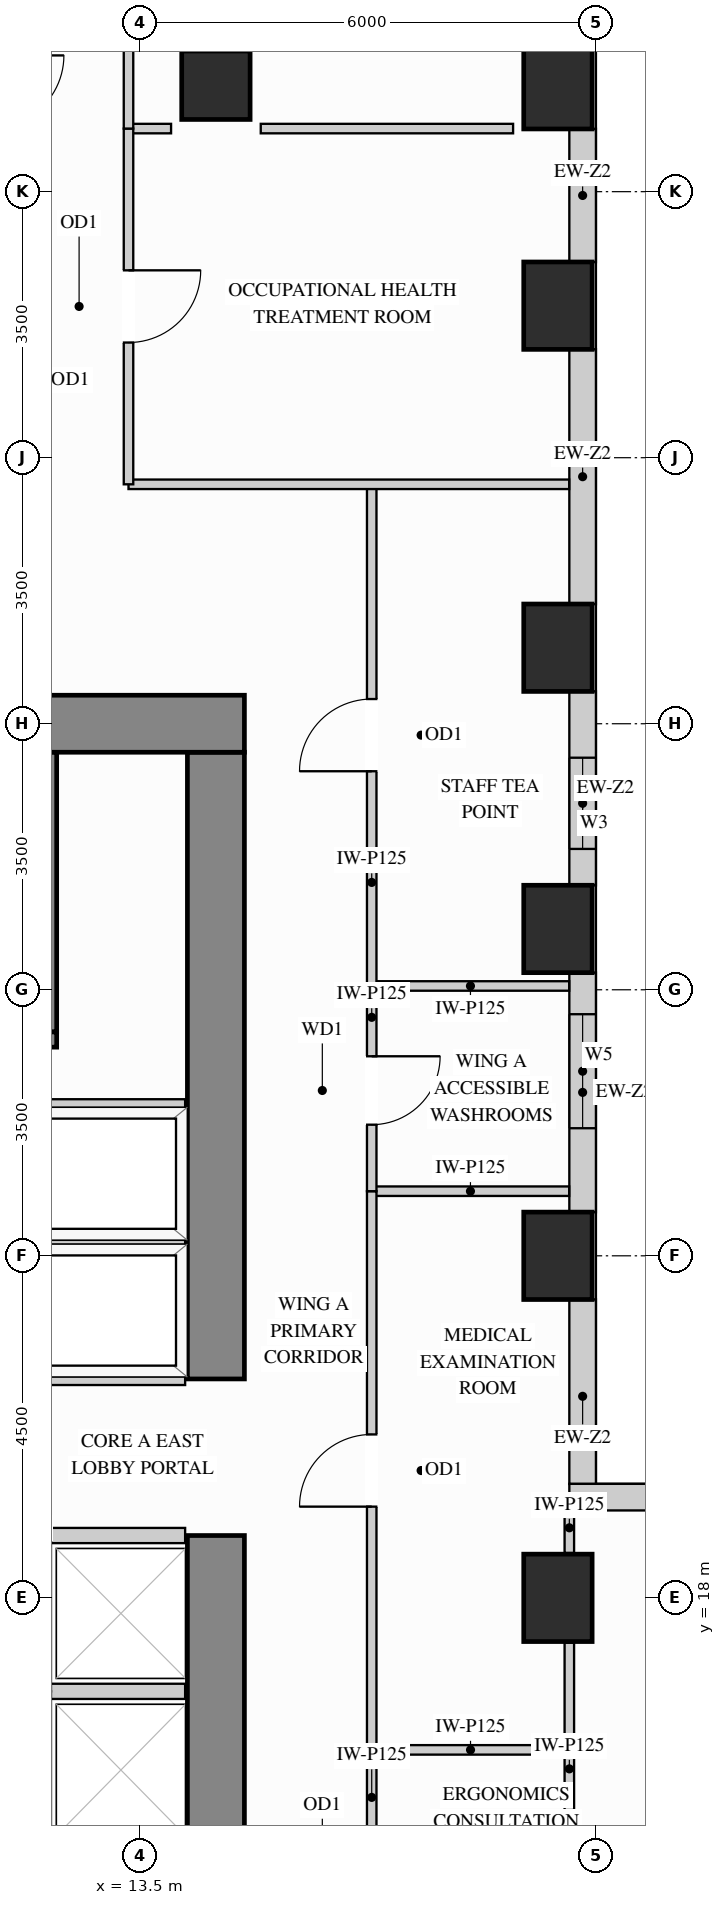
"""IFC4 building model, lengths in metres.
Left out: names, types, materials, properties, quantities, classifications, styles, units other than length and angle.
Written with IfcOpenShell. Run it as: python <this file> out.ifc"""

import sys

from ifc_helpers import new_model, si_unit, direction, frame, frame_2d, origin, origin_2d, place, context, subcontext, project, spatial, rectangle, extrude, source, transform, mapped, element, fill, save


model = new_model("IFC4")
c1 = context("Model", 3, precision=1e-05, world=origin(), true_north=direction((0.0, 1.0)))
c2 = subcontext(c1, "Body", "Model", "MODEL_VIEW")
j1 = project(units=[si_unit("LENGTHUNIT", "METRE"), si_unit("PLANEANGLEUNIT", "RADIAN")], contexts=[c1])
p1 = place(None, origin())
s1 = spatial("IfcSite", under=j1, at=p1, CompositionType="ELEMENT")
p2 = place(p1, origin())
s2 = spatial("IfcBuilding", under=s1, at=p2, CompositionType="ELEMENT")
p3 = place(p2, frame((0.0, 0.0, 117.0)))
s3 = spatial("IfcBuildingStorey", under=s2, at=p3, CompositionType="ELEMENT", Elevation=117.0)
m1 = source(origin(), c2, "Body", "SweptSolid", [
    extrude(rectangle(XDim=0.9, YDim=0.9, at=origin_2d()), origin(), (0.0, 0.0, 1.0), 3.38),
])
p4 = place(p3, frame((14.5, 37.9, 0.0), z_axis=(0.0, 0.0, 1.0), x_axis=(1.0, 0.0, 0.0)))
e1 = element("IfcColumn", 1, at=p4, inside=s3, PredefinedType="COLUMN", context=c2, shape_type="MappedRepresentation", body=[
    mapped(m1, transform((0.0, 0.0, 0.0), x_axis=(1.0, 0.0, 0.0), y_axis=(0.0, 1.0, 0.0), z_axis=(0.0, 0.0, 1.0))),
])
m2 = source(origin(), c2, "Body", "SweptSolid", [
    extrude(rectangle(XDim=0.9, YDim=1.15, at=origin_2d()), origin(), (0.0, 0.0, 1.0), 3.38),
])
for number, where, z_axis, x_axis in (
    (2, (19.0, 18.0, 0.0), (0.0, 0.0, 1.0), (1.0, 0.0, 0.0)),
    (3, (19.0, 22.5, 0.0), (0.0, 0.0, 1.0), (1.0, 0.0, 0.0)),
    (4, (19.0, 26.8, 0.0), (0.0, 0.0, 1.0), (1.0, 0.0, 0.0)),
    (5, (19.0, 30.5, 0.0), (0.0, 0.0, 1.0), (1.0, 0.0, 0.0)),
    (6, (19.0, 35.0, 0.0), (0.0, 0.0, 1.0), (1.0, 0.0, 0.0)),
    (7, (19.0, 37.9, 0.0), (0.0, 0.0, 1.0), (1.0, 0.0, 0.0)),
):
    element("IfcColumn", number, at=place(p3, frame(where, z_axis=z_axis, x_axis=x_axis)), inside=s3, PredefinedType="COLUMN", context=c2, shape_type="MappedRepresentation", body=[
        mapped(m2, transform((0.0, 0.0, 0.0), x_axis=(1.0, 0.0, 0.0), y_axis=(0.0, 1.0, 0.0), z_axis=(0.0, 0.0, 1.0))),
    ])
m3 = source(origin(), c2, "Body", "SweptSolid", [
    extrude(rectangle(XDim=9.945, YDim=0.75, at=frame_2d((4.973, 0.0))), origin(), (0.0, 0.0, 1.0), 3.38),
])
p5 = place(p3, frame((14.5, 8.875, 0.0), z_axis=(0.0, 0.0, 1.0), x_axis=(0.0, 1.0, 0.0)))
e8 = element("IfcWall", 8, at=p5, inside=s3, PredefinedType="SHEAR", context=c2, shape_type="MappedRepresentation", body=[
    mapped(m3, transform((0.0, 0.0, 0.0), x_axis=(1.0, 0.0, 0.0), y_axis=(0.0, 1.0, 0.0), z_axis=(0.0, 0.0, 1.0))),
])
m4 = source(origin(), c2, "Body", "SweptSolid", [
    extrude(rectangle(XDim=8.245, YDim=0.75, at=frame_2d((4.123, 0.0))), origin(), (0.0, 0.0, 1.0), 3.38),
])
p6 = place(p3, frame((14.5, 20.88, 0.0), z_axis=(0.0, 0.0, 1.0), x_axis=(0.0, 1.0, 0.0)))
e9 = element("IfcWall", 9, at=p6, inside=s3, PredefinedType="SHEAR", context=c2, shape_type="MappedRepresentation", body=[
    mapped(m4, transform((0.0, 0.0, 0.0), x_axis=(1.0, 0.0, 0.0), y_axis=(0.0, 1.0, 0.0), z_axis=(0.0, 0.0, 1.0))),
])
m5 = source(origin(), c2, "Body", "SweptSolid", [
    extrude(rectangle(XDim=10.75, YDim=0.75, at=frame_2d((5.375, 0.0))), origin(), (0.0, 0.0, 1.0), 3.38),
])
p7 = place(p3, frame((4.125, 29.5, 0.0), z_axis=(0.0, 0.0, 1.0), x_axis=(1.0, 0.0, 0.0)))
e10 = element("IfcWall", 10, at=p7, inside=s3, PredefinedType="SHEAR", context=c2, shape_type="MappedRepresentation", body=[
    mapped(m5, transform((0.0, 0.0, 0.0), x_axis=(1.0, 0.0, 0.0), y_axis=(0.0, 1.0, 0.0), z_axis=(0.0, 0.0, 1.0))),
])
m6 = source(origin(), c2, "Body", "SweptSolid", [
    extrude(rectangle(XDim=2.429, YDim=0.35, at=frame_2d((1.214, 0.0))), origin(), (0.0, 0.0, 1.0), 2.519),
])
p8 = place(p3, frame((19.325, 19.498, 0.0), z_axis=(0.0, 0.0, 1.0), x_axis=(0.0, 1.0, 0.0)))
e11 = element("IfcWall", 11, at=p8, inside=s3, PredefinedType="SOLIDWALL", context=c2, shape_type="MappedRepresentation", body=[
    mapped(m6, transform((0.0, 0.0, 0.0), x_axis=(1.0, 0.0, 0.0), y_axis=(0.0, 1.0, 0.0), z_axis=(0.0, 0.0, 1.0))),
])
p9 = place(p3, frame((19.325, 23.073, 0.0), z_axis=(0.0, 0.0, 1.0), x_axis=(0.0, 1.0, 0.0)))
e12 = element("IfcWall", 12, at=p9, inside=s3, PredefinedType="SOLIDWALL", context=c2, shape_type="SweptSolid", body=[
    extrude(rectangle(XDim=3.154, YDim=0.35, at=frame_2d((1.577, 0.0))), origin(), (0.0, 0.0, 1.0), 2.519),
])
p10 = place(p9, frame((1.105, 0.0, 0.78)))
e13 = element("IfcOpeningElement", 13, at=p10, cuts=e12, PredefinedType="OPENING", context=c2, shape_type="SweptSolid", body=[
    extrude(rectangle(XDim=1.5, YDim=1.559, at=frame_2d((0.75, 0.78))), frame((0.0, 0.185, 0.0), z_axis=(0.0, -1.0, 0.0), x_axis=(1.0, 0.0, 0.0)), (0.0, 0.0, 1.0), 0.37),
])
p11 = place(p3, frame((19.325, 27.373, 0.0), z_axis=(0.0, 0.0, 1.0), x_axis=(0.0, 1.0, 0.0)))
e14 = element("IfcWall", 14, at=p11, inside=s3, PredefinedType="SOLIDWALL", context=c2, shape_type="SweptSolid", body=[
    extrude(rectangle(XDim=2.554, YDim=0.35, at=frame_2d((1.277, 0.0))), origin(), (0.0, 0.0, 1.0), 2.519),
])
p12 = place(p11, frame((0.48, 0.0, 0.78)))
e15 = element("IfcOpeningElement", 15, at=p12, cuts=e14, PredefinedType="OPENING", context=c2, shape_type="SweptSolid", body=[
    extrude(rectangle(XDim=1.2, YDim=1.559, at=frame_2d((0.6, 0.78))), frame((0.0, 0.185, 0.0), z_axis=(0.0, -1.0, 0.0), x_axis=(1.0, 0.0, 0.0)), (0.0, 0.0, 1.0), 0.37),
])
m7 = source(origin(), c2, "Body", "SweptSolid", [
    extrude(rectangle(XDim=3.354, YDim=0.35, at=frame_2d((1.677, 0.0))), origin(), (0.0, 0.0, 1.0), 2.519),
])
p13 = place(p3, frame((19.325, 31.073, 0.0), z_axis=(0.0, 0.0, 1.0), x_axis=(0.0, 1.0, 0.0)))
e16 = element("IfcWall", 16, at=p13, inside=s3, PredefinedType="SOLIDWALL", context=c2, shape_type="MappedRepresentation", body=[
    mapped(m7, transform((0.0, 0.0, 0.0), x_axis=(1.0, 0.0, 0.0), y_axis=(0.0, 1.0, 0.0), z_axis=(0.0, 0.0, 1.0))),
])
m8 = source(origin(), c2, "Body", "SweptSolid", [
    extrude(rectangle(XDim=1.754, YDim=0.35, at=frame_2d((0.877, 0.0))), origin(), (0.0, 0.0, 1.0), 2.519),
])
p14 = place(p3, frame((19.325, 35.573, 0.0), z_axis=(0.0, 0.0, 1.0), x_axis=(0.0, 1.0, 0.0)))
e17 = element("IfcWall", 17, at=p14, inside=s3, PredefinedType="SOLIDWALL", context=c2, shape_type="MappedRepresentation", body=[
    mapped(m8, transform((0.0, 0.0, 0.0), x_axis=(1.0, 0.0, 0.0), y_axis=(0.0, 1.0, 0.0), z_axis=(0.0, 0.0, 1.0))),
])
p15 = place(p3, frame((34.75, 19.325, 0.0), z_axis=(0.0, 0.0, 1.0), x_axis=(-1.0, 0.0, 0.0)))
e18 = element("IfcWall", 18, at=p15, inside=s3, PredefinedType="SOLIDWALL", context=c2, shape_type="SweptSolid", body=[
    extrude(rectangle(XDim=15.6, YDim=0.35, at=frame_2d((7.8, 0.0))), origin(), (0.0, 0.0, 1.0), 3.365),
])
p16 = place(p15, frame((4.307, 0.0, 0.78)))
e19 = element("IfcOpeningElement", 19, at=p16, cuts=e18, PredefinedType="OPENING", context=c2, shape_type="SweptSolid", body=[
    extrude(rectangle(XDim=1.5, YDim=2.0, at=frame_2d((0.75, 1.0))), frame((0.0, 0.185, 0.0), z_axis=(0.0, -1.0, 0.0), x_axis=(1.0, 0.0, 0.0)), (0.0, 0.0, 1.0), 0.37),
])
p17 = place(p15, frame((9.793, 0.0, 0.78)))
e20 = element("IfcOpeningElement", 20, at=p17, cuts=e18, PredefinedType="OPENING", context=c2, shape_type="SweptSolid", body=[
    extrude(rectangle(XDim=1.5, YDim=2.0, at=frame_2d((0.75, 1.0))), frame((0.0, 0.185, 0.0), z_axis=(0.0, -1.0, 0.0), x_axis=(1.0, 0.0, 0.0)), (0.0, 0.0, 1.0), 0.37),
])
m9 = source(origin(), c2, "Body", "SweptSolid", [
    extrude(rectangle(XDim=2.6, YDim=0.125, at=frame_2d((1.3, 0.0))), origin(), (0.0, 0.0, 1.0), 3.365),
])
p18 = place(p3, frame((16.55, 16.0, 0.0), z_axis=(0.0, 0.0, 1.0), x_axis=(1.0, 0.0, 0.0)))
e21 = element("IfcWall", 21, at=p18, inside=s3, PredefinedType="PARTITIONING", context=c2, shape_type="MappedRepresentation", body=[
    mapped(m9, transform((0.0, 0.0, 0.0), x_axis=(1.0, 0.0, 0.0), y_axis=(0.0, 1.0, 0.0), z_axis=(0.0, 0.0, 1.0))),
])
m10 = source(origin(), c2, "Body", "SweptSolid", [
    extrude(rectangle(XDim=2.598, YDim=0.125, at=frame_2d((1.299, 0.0))), origin(), (0.0, 0.0, 1.0), 3.365),
])
for number, where, z_axis, x_axis in (
    (22, (16.55, 23.35, 0.0), (0.0, 0.0, 1.0), (1.0, 0.0, 0.0)),
    (23, (16.55, 26.05, 0.0), (0.0, 0.0, 1.0), (1.0, 0.0, 0.0)),
):
    element("IfcWall", number, at=place(p3, frame(where, z_axis=z_axis, x_axis=x_axis)), inside=s3, PredefinedType="PARTITIONING", context=c2, shape_type="MappedRepresentation", body=[
        mapped(m10, transform((0.0, 0.0, 0.0), x_axis=(1.0, 0.0, 0.0), y_axis=(0.0, 1.0, 0.0), z_axis=(0.0, 0.0, 1.0))),
    ])
m11 = source(origin(), c2, "Body", "SweptSolid", [
    extrude(rectangle(XDim=3.32, YDim=0.125, at=frame_2d((1.66, 0.0))), origin(), (0.0, 0.0, 1.0), 2.677),
])
p19 = place(p3, frame((19.15, 14.09, 0.0), z_axis=(0.0, 0.0, 1.0), x_axis=(0.0, 1.0, 0.0)))
e24 = element("IfcWall", 24, at=p19, inside=s3, PredefinedType="PARTITIONING", context=c2, shape_type="MappedRepresentation", body=[
    mapped(m11, transform((0.0, 0.0, 0.0), x_axis=(1.0, 0.0, 0.0), y_axis=(0.0, 1.0, 0.0), z_axis=(0.0, 0.0, 1.0))),
])
m12 = source(origin(), c2, "Body", "SweptSolid", [
    extrude(rectangle(XDim=0.558, YDim=0.125, at=frame_2d((0.279, 0.0))), origin(), (0.0, 0.0, 1.0), 2.519),
])
p20 = place(p3, frame((19.15, 18.59, 0.0), z_axis=(0.0, 0.0, 1.0), x_axis=(0.0, 1.0, 0.0)))
e25 = element("IfcWall", 25, at=p20, inside=s3, PredefinedType="PARTITIONING", context=c2, shape_type="MappedRepresentation", body=[
    mapped(m12, transform((0.0, 0.0, 0.0), x_axis=(1.0, 0.0, 0.0), y_axis=(0.0, 1.0, 0.0), z_axis=(0.0, 0.0, 1.0))),
])
p21 = place(p3, frame((16.55, 12.35, 0.0), z_axis=(0.0, 0.0, 1.0), x_axis=(0.0, 1.0, 0.0)))
e26 = element("IfcWall", 26, at=p21, inside=s3, PredefinedType="PARTITIONING", context=c2, shape_type="SweptSolid", body=[
    extrude(rectangle(XDim=3.65, YDim=0.125, at=frame_2d((1.825, 0.0))), origin(), (0.0, 0.0, 1.0), 3.365),
])
p22 = place(p21, frame((1.35, 0.0, 0.0)))
e27 = element("IfcOpeningElement", 27, at=p22, cuts=e26, PredefinedType="OPENING", context=c2, shape_type="SweptSolid", body=[
    extrude(rectangle(XDim=0.95, YDim=2.15, at=frame_2d((0.475, 1.075))), frame((0.0, 0.073, 0.0), z_axis=(0.0, -1.0, 0.0), x_axis=(1.0, 0.0, 0.0)), (0.0, 0.0, 1.0), 0.145),
])
p23 = place(p3, frame((16.55, 16.0, 0.0), z_axis=(0.0, 0.0, 1.0), x_axis=(0.0, 1.0, 0.0)))
e28 = element("IfcWall", 28, at=p23, inside=s3, PredefinedType="PARTITIONING", context=c2, shape_type="SweptSolid", body=[
    extrude(rectangle(XDim=7.35, YDim=0.125, at=frame_2d((3.675, 0.0))), origin(), (0.0, 0.0, 1.0), 3.365),
])
p24 = place(p23, frame((3.2, 0.0, 0.0)))
e29 = element("IfcOpeningElement", 29, at=p24, cuts=e28, PredefinedType="OPENING", context=c2, shape_type="SweptSolid", body=[
    extrude(rectangle(XDim=0.95, YDim=2.15, at=frame_2d((0.475, 1.075))), frame((0.0, 0.073, 0.0), z_axis=(0.0, -1.0, 0.0), x_axis=(1.0, 0.0, 0.0)), (0.0, 0.0, 1.0), 0.145),
])
p25 = place(p3, frame((16.55, 26.05, 0.0), z_axis=(0.0, 0.0, 1.0), x_axis=(0.0, 1.0, 0.0)))
e30 = element("IfcWall", 30, at=p25, inside=s3, PredefinedType="PARTITIONING", context=c2, shape_type="SweptSolid", body=[
    extrude(rectangle(XDim=6.6, YDim=0.125, at=frame_2d((3.3, 0.0))), origin(), (0.0, 0.0, 1.0), 3.365),
])
p26 = place(p25, frame((2.825, 0.0, 0.0)))
e31 = element("IfcOpeningElement", 31, at=p26, cuts=e30, PredefinedType="OPENING", context=c2, shape_type="SweptSolid", body=[
    extrude(rectangle(XDim=0.95, YDim=2.15, at=frame_2d((0.475, 1.075))), frame((0.0, 0.073, 0.0), z_axis=(0.0, -1.0, 0.0), x_axis=(1.0, 0.0, 0.0)), (0.0, 0.0, 1.0), 0.145),
])
p27 = place(p3, frame((16.55, 23.35, 0.0), z_axis=(0.0, 0.0, 1.0), x_axis=(0.0, 1.0, 0.0)))
e32 = element("IfcWall", 32, at=p27, inside=s3, PredefinedType="PARTITIONING", context=c2, shape_type="SweptSolid", body=[
    extrude(rectangle(XDim=2.7, YDim=0.125, at=frame_2d((1.35, 0.0))), origin(), (0.0, 0.0, 1.0), 3.365),
])
p28 = place(p27, frame((0.875, 0.0, 0.0)))
e33 = element("IfcOpeningElement", 33, at=p28, cuts=e32, PredefinedType="OPENING", context=c2, shape_type="SweptSolid", body=[
    extrude(rectangle(XDim=0.9, YDim=2.15, at=frame_2d((0.45, 1.075))), frame((0.0, 0.073, 0.0), z_axis=(0.0, -1.0, 0.0), x_axis=(1.0, 0.0, 0.0)), (0.0, 0.0, 1.0), 0.145),
])
m13 = source(origin(), c2, "Body", "SweptSolid", [
    extrude(rectangle(XDim=0.56, YDim=0.125, at=frame_2d((0.28, 0.0))), origin(), (0.0, 0.0, 1.0), 3.365),
])
p29 = place(p3, frame((13.35, 37.33, 0.0), z_axis=(0.0, 0.0, 1.0), x_axis=(1.0, 0.0, 0.0)))
e34 = element("IfcWall", 34, at=p29, inside=s3, PredefinedType="PARTITIONING", context=c2, shape_type="MappedRepresentation", body=[
    mapped(m13, transform((0.0, 0.0, 0.0), x_axis=(1.0, 0.0, 0.0), y_axis=(0.0, 1.0, 0.0), z_axis=(0.0, 0.0, 1.0))),
])
m14 = source(origin(), c2, "Body", "SweptSolid", [
    extrude(rectangle(XDim=3.32, YDim=0.125, at=frame_2d((1.66, 0.0))), origin(), (0.0, 0.0, 1.0), 3.365),
])
p30 = place(p3, frame((15.09, 37.33, 0.0), z_axis=(0.0, 0.0, 1.0), x_axis=(1.0, 0.0, 0.0)))
e35 = element("IfcWall", 35, at=p30, inside=s3, PredefinedType="PARTITIONING", context=c2, shape_type="MappedRepresentation", body=[
    mapped(m14, transform((0.0, 0.0, 0.0), x_axis=(1.0, 0.0, 0.0), y_axis=(0.0, 1.0, 0.0), z_axis=(0.0, 0.0, 1.0))),
])
m15 = source(origin(), c2, "Body", "SweptSolid", [
    extrude(rectangle(XDim=5.798, YDim=0.125, at=frame_2d((2.899, 0.0))), origin(), (0.0, 0.0, 1.0), 3.365),
])
p31 = place(p3, frame((13.35, 32.65, 0.0), z_axis=(0.0, 0.0, 1.0), x_axis=(1.0, 0.0, 0.0)))
e36 = element("IfcWall", 36, at=p31, inside=s3, PredefinedType="PARTITIONING", context=c2, shape_type="MappedRepresentation", body=[
    mapped(m15, transform((0.0, 0.0, 0.0), x_axis=(1.0, 0.0, 0.0), y_axis=(0.0, 1.0, 0.0), z_axis=(0.0, 0.0, 1.0))),
])
p32 = place(p3, frame((13.35, 32.65, 0.0), z_axis=(0.0, 0.0, 1.0), x_axis=(0.0, 1.0, 0.0)))
e37 = element("IfcWall", 37, at=p32, inside=s3, PredefinedType="PARTITIONING", context=c2, shape_type="SweptSolid", body=[
    extrude(rectangle(XDim=4.68, YDim=0.125, at=frame_2d((2.34, 0.0))), origin(), (0.0, 0.0, 1.0), 3.365),
])
p33 = place(p32, frame((1.865, 0.0, 0.0)))
e38 = element("IfcOpeningElement", 38, at=p33, cuts=e37, PredefinedType="OPENING", context=c2, shape_type="SweptSolid", body=[
    extrude(rectangle(XDim=0.95, YDim=2.15, at=frame_2d((0.475, 1.075))), frame((0.0, 0.073, 0.0), z_axis=(0.0, -1.0, 0.0), x_axis=(1.0, 0.0, 0.0)), (0.0, 0.0, 1.0), 0.145),
])
p34 = place(p3, frame((13.35, 37.33, 0.0), z_axis=(0.0, 0.0, 1.0), x_axis=(0.0, 1.0, 0.0)))
e39 = element("IfcWall", 39, at=p34, inside=s3, PredefinedType="PARTITIONING", context=c2, shape_type="SweptSolid", body=[
    extrude(rectangle(XDim=5.07, YDim=0.125, at=frame_2d((2.535, 0.0))), origin(), (0.0, 0.0, 1.0), 3.365),
])
p35 = place(p34, frame((2.06, 0.0, 0.0)))
e40 = element("IfcOpeningElement", 40, at=p35, cuts=e39, PredefinedType="OPENING", context=c2, shape_type="SweptSolid", body=[
    extrude(rectangle(XDim=0.95, YDim=2.15, at=frame_2d((0.475, 1.075))), frame((0.0, 0.073, 0.0), z_axis=(0.0, -1.0, 0.0), x_axis=(1.0, 0.0, 0.0)), (0.0, 0.0, 1.0), 0.145),
])
m16 = source(origin(), c2, "Body", "SweptSolid", [
    extrude(rectangle(XDim=2.265, YDim=0.2, at=frame_2d((1.132, 0.0))), origin(), (0.0, 0.0, 1.0), 3.365),
])
for number, where, z_axis, x_axis in (
    (41, (11.83, 22.66, 0.0), (0.0, 0.0, 1.0), (1.0, 0.0, 0.0)),
    (42, (11.83, 20.9, 0.0), (0.0, 0.0, 1.0), (1.0, 0.0, 0.0)),
    (43, (11.83, 24.46, 0.0), (0.0, 0.0, 1.0), (1.0, 0.0, 0.0)),
):
    element("IfcWall", number, at=place(p3, frame(where, z_axis=z_axis, x_axis=x_axis)), inside=s3, PredefinedType="PARTITIONING", context=c2, shape_type="MappedRepresentation", body=[
        mapped(m16, transform((0.0, 0.0, 0.0), x_axis=(1.0, 0.0, 0.0), y_axis=(0.0, 1.0, 0.0), z_axis=(0.0, 0.0, 1.0))),
    ])
m17 = source(origin(), c2, "Body", "SweptSolid", [
    extrude(rectangle(XDim=1.865, YDim=0.2, at=frame_2d((0.933, 0.0))), origin(), (0.0, 0.0, 1.0), 3.365),
])
for number, where, z_axis, x_axis in (
    (44, (12.23, 16.77, 0.0), (0.0, 0.0, 1.0), (1.0, 0.0, 0.0)),
    (45, (12.23, 18.82, 0.0), (0.0, 0.0, 1.0), (1.0, 0.0, 0.0)),
):
    element("IfcWall", number, at=place(p3, frame(where, z_axis=z_axis, x_axis=x_axis)), inside=s3, PredefinedType="PARTITIONING", context=c2, shape_type="MappedRepresentation", body=[
        mapped(m17, transform((0.0, 0.0, 0.0), x_axis=(1.0, 0.0, 0.0), y_axis=(0.0, 1.0, 0.0), z_axis=(0.0, 0.0, 1.0))),
    ])
m18 = source(origin(), c2, "Body", "SweptSolid", [
    extrude(rectangle(XDim=3.678, YDim=0.2, at=frame_2d((1.839, 0.0))), origin(), (0.0, 0.0, 1.0), 3.38),
])
p36 = place(p3, frame((12.305, 25.445, 0.0), z_axis=(0.0, 0.0, 1.0), x_axis=(0.0, 1.0, 0.0)))
e46 = element("IfcWall", 46, at=p36, inside=s3, PredefinedType="SHEAR", context=c2, shape_type="MappedRepresentation", body=[
    mapped(m18, transform((0.0, 0.0, 0.0), x_axis=(1.0, 0.0, 0.0), y_axis=(0.0, 1.0, 0.0), z_axis=(0.0, 0.0, 1.0))),
])
p37 = place(p3, frame((4.877, 25.345, 0.0), z_axis=(0.0, 0.0, 1.0), x_axis=(1.0, 0.0, 0.0)))
e47 = element("IfcWall", 47, at=p37, inside=s3, PredefinedType="SHEAR", context=c2, shape_type="SweptSolid", body=[
    extrude(rectangle(XDim=7.528, YDim=0.2, at=frame_2d((3.764, 0.0))), origin(), (0.0, 0.0, 1.0), 3.38),
])
p38 = place(p37, frame((0.4, 0.0, 0.0)))
e48 = element("IfcOpeningElement", 48, at=p38, cuts=e47, PredefinedType="OPENING", context=c2, shape_type="SweptSolid", body=[
    extrude(rectangle(XDim=1.1, YDim=2.15, at=frame_2d((0.55, 1.075))), frame((0.0, 0.11, 0.0), z_axis=(0.0, -1.0, 0.0), x_axis=(1.0, 0.0, 0.0)), (0.0, 0.0, 1.0), 0.22),
])
m19 = source(origin(), c2, "Body", "SweptSolid", [
    extrude(rectangle(XDim=0.95, YDim=2.15, at=frame_2d((0.475, 1.075))), frame((0.0, 0.025, 0.0), z_axis=(0.0, -1.0, 0.0), x_axis=(1.0, 0.0, 0.0)), (0.0, 0.0, 1.0), 0.05),
])
p39 = place(p24, origin())
e49 = element("IfcDoor", 49, at=p39, inside=s3, OperationType="SINGLE_SWING_LEFT", PredefinedType="DOOR", context=c2, shape_type="MappedRepresentation", body=[
    mapped(m19, transform((0.0, 0.0, 0.0), x_axis=(1.0, 0.0, 0.0), y_axis=(0.0, 1.0, 0.0), z_axis=(0.0, 0.0, 1.0))),
])
fill(e29, e49)
p40 = place(p26, origin())
e50 = element("IfcDoor", 50, at=p40, inside=s3, OperationType="SINGLE_SWING_LEFT", PredefinedType="DOOR", context=c2, shape_type="MappedRepresentation", body=[
    mapped(m19, transform((0.0, 0.0, 0.0), x_axis=(1.0, 0.0, 0.0), y_axis=(0.0, 1.0, 0.0), z_axis=(0.0, 0.0, 1.0))),
])
fill(e31, e50)
p41 = place(p33, origin())
e51 = element("IfcDoor", 51, at=p41, inside=s3, OperationType="SINGLE_SWING_RIGHT", PredefinedType="DOOR", context=c2, shape_type="MappedRepresentation", body=[
    mapped(m19, transform((0.0, 0.0, 0.0), x_axis=(1.0, 0.0, 0.0), y_axis=(0.0, 1.0, 0.0), z_axis=(0.0, 0.0, 1.0))),
])
fill(e38, e51)
m20 = source(origin(), c2, "Body", "SweptSolid", [
    extrude(rectangle(XDim=0.9, YDim=2.15, at=frame_2d((0.45, 1.075))), frame((0.0, 0.025, 0.0), z_axis=(0.0, -1.0, 0.0), x_axis=(1.0, 0.0, 0.0)), (0.0, 0.0, 1.0), 0.05),
])
p42 = place(p28, origin())
e52 = element("IfcDoor", 52, at=p42, inside=s3, OperationType="SINGLE_SWING_RIGHT", PredefinedType="DOOR", context=c2, shape_type="MappedRepresentation", body=[
    mapped(m20, transform((0.0, 0.0, 0.0), x_axis=(1.0, 0.0, 0.0), y_axis=(0.0, 1.0, 0.0), z_axis=(0.0, 0.0, 1.0))),
])
fill(e33, e52)
m21 = source(origin(), c2, "Body", "SweptSolid", [
    extrude(rectangle(XDim=1.2, YDim=1.559, at=frame_2d((0.6, 0.78))), frame((0.0, 0.03, 0.0), z_axis=(0.0, -1.0, 0.0), x_axis=(1.0, 0.0, 0.0)), (0.0, 0.0, 1.0), 0.06),
])
p43 = place(p12, origin())
e53 = element("IfcWindow", 53, at=p43, inside=s3, PartitioningType="SINGLE_PANEL", PredefinedType="WINDOW", context=c2, shape_type="MappedRepresentation", body=[
    mapped(m21, transform((0.0, 0.0, 0.0), x_axis=(1.0, 0.0, 0.0), y_axis=(0.0, 1.0, 0.0), z_axis=(0.0, 0.0, 1.0))),
])
fill(e15, e53)
m22 = source(origin(), c2, "Body", "SweptSolid", [
    extrude(rectangle(XDim=1.5, YDim=1.559, at=frame_2d((0.75, 0.78))), frame((0.0, 0.03, 0.0), z_axis=(0.0, -1.0, 0.0), x_axis=(1.0, 0.0, 0.0)), (0.0, 0.0, 1.0), 0.06),
])
p44 = place(p10, origin())
e54 = element("IfcWindow", 54, at=p44, inside=s3, PartitioningType="SINGLE_PANEL", PredefinedType="WINDOW", context=c2, shape_type="MappedRepresentation", body=[
    mapped(m22, transform((0.0, 0.0, 0.0), x_axis=(1.0, 0.0, 0.0), y_axis=(0.0, 1.0, 0.0), z_axis=(0.0, 0.0, 1.0))),
])
fill(e13, e54)
save(model, sys.argv[1])
